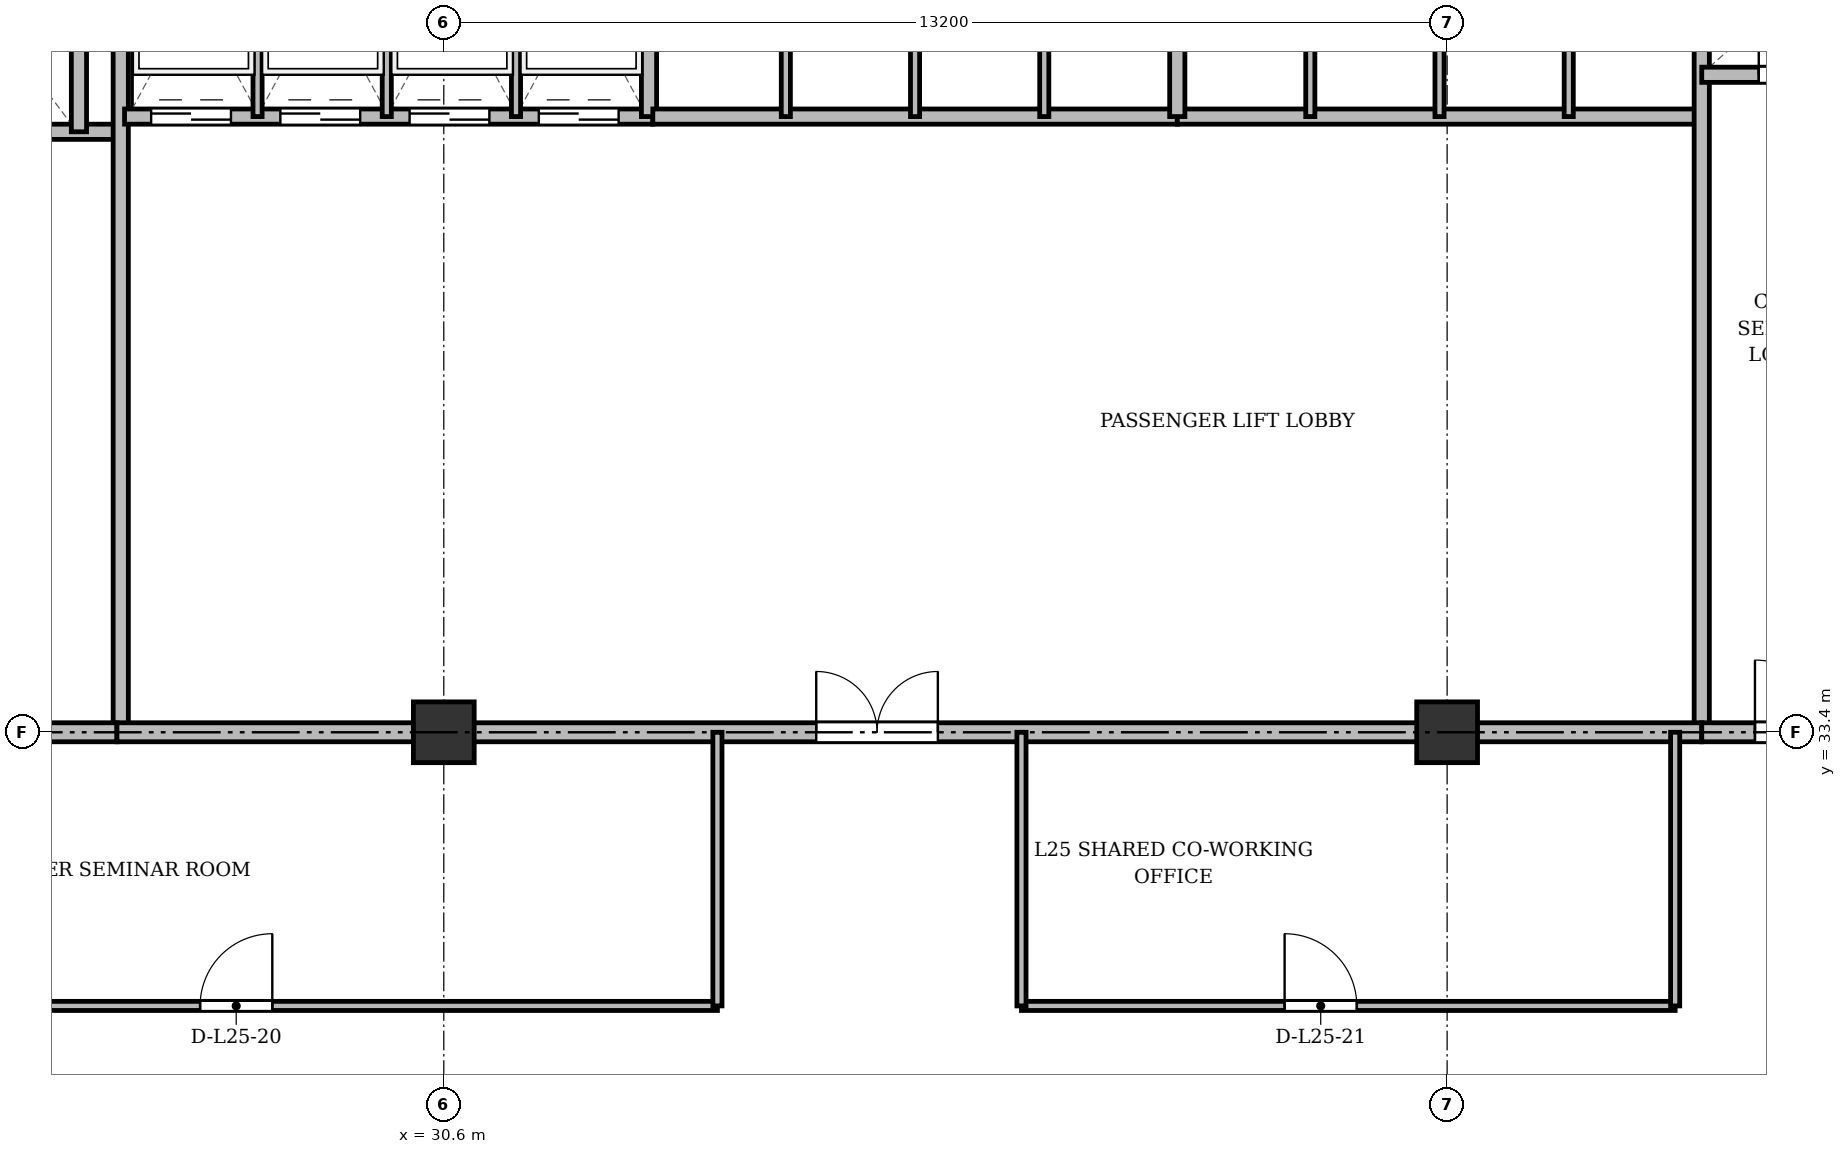
"""IFC4 building model, lengths in metres.
Left out: names, types, materials, properties, quantities, classifications, styles, units other than length and angle.
Written with IfcOpenShell. Run it as: python <this file> out.ifc"""

import sys

from ifc_helpers import new_model, si_unit, direction, frame, frame_2d, origin, origin_2d, place, context, subcontext, project, spatial, rectangle, extrude, source, transform, mapped, element, fill, save


model = new_model("IFC4")
c1 = context("Model", 3, precision=1e-05, world=origin(), true_north=direction((0.0, 1.0)))
c2 = subcontext(c1, "Body", "Model", "MODEL_VIEW")
j1 = project(units=[si_unit("LENGTHUNIT", "METRE"), si_unit("PLANEANGLEUNIT", "RADIAN")], contexts=[c1])
p1 = place(None, origin())
s1 = spatial("IfcSite", under=j1, at=p1, CompositionType="ELEMENT")
p2 = place(p1, origin())
s2 = spatial("IfcBuilding", under=s1, at=p2, CompositionType="ELEMENT")
p3 = place(p2, frame((0.0, 0.0, 99.7)))
s3 = spatial("IfcBuildingStorey", under=s2, at=p3, CompositionType="ELEMENT", Elevation=99.7)
m1 = source(origin(), c2, "Body", "SweptSolid", [
    extrude(rectangle(XDim=0.8, YDim=0.8, at=origin_2d()), origin(), (0.0, 0.0, 1.0), 3.6),
])
for number, where, z_axis, x_axis in (
    (1, (30.6, 33.4, 0.0), (0.0, 0.0, 1.0), (1.0, 0.0, 0.0)),
    (2, (43.8, 33.4, 0.0), (0.0, 0.0, 1.0), (1.0, 0.0, 0.0)),
):
    element("IfcColumn", number, at=place(p3, frame(where, z_axis=z_axis, x_axis=x_axis)), inside=s3, PredefinedType="COLUMN", context=c2, shape_type="MappedRepresentation", body=[
        mapped(m1, transform((0.0, 0.0, 0.0), x_axis=(1.0, 0.0, 0.0), y_axis=(0.0, 1.0, 0.0), z_axis=(0.0, 0.0, 1.0), scale=1.0)),
    ])
p4 = place(p3, frame((19.55, 41.3, 0.0), z_axis=(0.0, 0.0, 1.0), x_axis=(1.0, 0.0, 0.0)))
e3 = element("IfcWall", 3, at=p4, inside=s3, PredefinedType="SOLIDWALL", context=c2, shape_type="SweptSolid", body=[
    extrude(rectangle(XDim=6.75, YDim=0.2, at=frame_2d((3.375, 0.0))), origin(), (0.0, 0.0, 1.0), 3.34),
])
p5 = place(p4, frame((1.7, 0.0, 0.0)))
e4 = element("IfcOpeningElement", 4, at=p5, cuts=e3, PredefinedType="OPENING", context=c2, shape_type="SweptSolid", body=[
    extrude(rectangle(XDim=1.1, YDim=2.15, at=frame_2d((0.55, 1.075))), frame((0.0, 0.11, 0.0), z_axis=(0.0, -1.0, 0.0), x_axis=(1.0, 0.0, 0.0)), (0.0, 0.0, 1.0), 0.22),
])
p6 = place(p4, frame((4.4, 0.0, 0.0)))
e5 = element("IfcOpeningElement", 5, at=p6, cuts=e3, PredefinedType="OPENING", context=c2, shape_type="SweptSolid", body=[
    extrude(rectangle(XDim=1.1, YDim=2.15, at=frame_2d((0.55, 1.075))), frame((0.0, 0.11, 0.0), z_axis=(0.0, -1.0, 0.0), x_axis=(1.0, 0.0, 0.0)), (0.0, 0.0, 1.0), 0.22),
])
p7 = place(p3, frame((25.8, 41.3, 0.0), z_axis=(0.0, 0.0, 1.0), x_axis=(0.0, 1.0, 0.0)))
e6 = element("IfcWall", 6, at=p7, inside=s3, PredefinedType="SOLIDWALL", context=c2, shape_type="SweptSolid", body=[
    extrude(rectangle(XDim=3.4, YDim=0.2, at=frame_2d((1.7, 0.0))), origin(), (0.0, 0.0, 1.0), 3.34),
])
p8 = place(p3, frame((26.35, 33.4, 0.0), z_axis=(0.0, 0.0, 1.0), x_axis=(0.0, 1.0, 0.0)))
e7 = element("IfcWall", 7, at=p8, inside=s3, PredefinedType="SOLIDWALL", context=c2, shape_type="SweptSolid", body=[
    extrude(rectangle(XDim=11.3, YDim=0.2, at=frame_2d((5.65, 0.0))), origin(), (0.0, 0.0, 1.0), 2.752),
])
p9 = place(p3, frame((19.5, 33.4, 0.0), z_axis=(0.0, 0.0, 1.0), x_axis=(1.0, 0.0, 0.0)))
e8 = element("IfcWall", 8, at=p9, inside=s3, PredefinedType="PARTITIONING", context=c2, shape_type="SweptSolid", body=[
    extrude(rectangle(XDim=6.8, YDim=0.25, at=frame_2d((3.4, 0.0))), origin(), (0.0, 0.0, 1.0), 2.752),
])
p10 = place(p9, frame((0.75, 0.0, 0.0)))
e9 = element("IfcOpeningElement", 9, at=p10, cuts=e8, PredefinedType="OPENING", context=c2, shape_type="SweptSolid", body=[
    extrude(rectangle(XDim=1.6, YDim=2.2, at=frame_2d((0.8, 1.1))), frame((0.0, 0.135, 0.0), z_axis=(0.0, -1.0, 0.0), x_axis=(1.0, 0.0, 0.0)), (0.0, 0.0, 1.0), 0.27),
])
p11 = place(p3, frame((26.4, 41.5, 0.0), z_axis=(0.0, 0.0, 1.0), x_axis=(1.0, 0.0, 0.0)))
e10 = element("IfcWall", 10, at=p11, inside=s3, PredefinedType="SOLIDWALL", context=c2, shape_type="SweptSolid", body=[
    extrude(rectangle(XDim=6.95, YDim=0.2, at=frame_2d((3.475, 0.0))), origin(), (0.0, 0.0, 1.0), 3.34),
])
p12 = place(p11, frame((0.35, 0.0, 0.0)))
e11 = element("IfcOpeningElement", 11, at=p12, cuts=e10, PredefinedType="OPENING", context=c2, shape_type="SweptSolid", body=[
    extrude(rectangle(XDim=1.05, YDim=2.15, at=frame_2d((0.525, 1.075))), frame((0.0, 0.11, 0.0), z_axis=(0.0, -1.0, 0.0), x_axis=(1.0, 0.0, 0.0)), (0.0, 0.0, 1.0), 0.22),
])
p13 = place(p11, frame((2.05, 0.0, 0.0)))
e12 = element("IfcOpeningElement", 12, at=p13, cuts=e10, PredefinedType="OPENING", context=c2, shape_type="SweptSolid", body=[
    extrude(rectangle(XDim=1.05, YDim=2.15, at=frame_2d((0.525, 1.075))), frame((0.0, 0.11, 0.0), z_axis=(0.0, -1.0, 0.0), x_axis=(1.0, 0.0, 0.0)), (0.0, 0.0, 1.0), 0.22),
])
p14 = place(p11, frame((3.75, 0.0, 0.0)))
e13 = element("IfcOpeningElement", 13, at=p14, cuts=e10, PredefinedType="OPENING", context=c2, shape_type="SweptSolid", body=[
    extrude(rectangle(XDim=1.05, YDim=2.15, at=frame_2d((0.525, 1.075))), frame((0.0, 0.11, 0.0), z_axis=(0.0, -1.0, 0.0), x_axis=(1.0, 0.0, 0.0)), (0.0, 0.0, 1.0), 0.22),
])
p15 = place(p11, frame((5.45, 0.0, 0.0)))
e14 = element("IfcOpeningElement", 14, at=p15, cuts=e10, PredefinedType="OPENING", context=c2, shape_type="SweptSolid", body=[
    extrude(rectangle(XDim=1.05, YDim=2.15, at=frame_2d((0.525, 1.075))), frame((0.0, 0.11, 0.0), z_axis=(0.0, -1.0, 0.0), x_axis=(1.0, 0.0, 0.0)), (0.0, 0.0, 1.0), 0.22),
])
p16 = place(p3, frame((33.3, 41.5, 0.0), z_axis=(0.0, 0.0, 1.0), x_axis=(0.0, 1.0, 0.0)))
e15 = element("IfcWall", 15, at=p16, inside=s3, PredefinedType="SOLIDWALL", context=c2, shape_type="SweptSolid", body=[
    extrude(rectangle(XDim=3.2, YDim=0.2, at=frame_2d((1.6, 0.0))), origin(), (0.0, 0.0, 1.0), 3.34),
])
for number, where, z_axis, x_axis in (
    (16, (28.15, 41.5, 0.0), (0.0, 0.0, 1.0), (0.0, 1.0, 0.0)),
    (17, (29.85, 41.5, 0.0), (0.0, 0.0, 1.0), (0.0, 1.0, 0.0)),
    (18, (31.55, 41.5, 0.0), (0.0, 0.0, 1.0), (0.0, 1.0, 0.0)),
):
    element("IfcWall", number, at=place(p3, frame(where, z_axis=z_axis, x_axis=x_axis)), inside=s3, PredefinedType="PARTITIONING", context=c2, shape_type="SweptSolid", body=[
        extrude(rectangle(XDim=3.2, YDim=0.12, at=frame_2d((1.6, 0.0))), origin(), (0.0, 0.0, 1.0), 3.34),
    ])
p17 = place(p3, frame((33.35, 41.5, 0.0), z_axis=(0.0, 0.0, 1.0), x_axis=(1.0, 0.0, 0.0)))
e19 = element("IfcWall", 19, at=p17, inside=s3, PredefinedType="SOLIDWALL", context=c2, shape_type="SweptSolid", body=[
    extrude(rectangle(XDim=6.9, YDim=0.2, at=frame_2d((3.45, 0.0))), origin(), (0.0, 0.0, 1.0), 3.34),
])
for number, where, z_axis, x_axis in (
    (20, (35.1, 41.5, 0.0), (0.0, 0.0, 1.0), (0.0, 1.0, 0.0)),
    (21, (36.8, 41.5, 0.0), (0.0, 0.0, 1.0), (0.0, 1.0, 0.0)),
    (22, (38.5, 41.5, 0.0), (0.0, 0.0, 1.0), (0.0, 1.0, 0.0)),
):
    element("IfcWall", number, at=place(p3, frame(where, z_axis=z_axis, x_axis=x_axis)), inside=s3, PredefinedType="PARTITIONING", context=c2, shape_type="SweptSolid", body=[
        extrude(rectangle(XDim=3.2, YDim=0.12, at=frame_2d((1.6, 0.0))), origin(), (0.0, 0.0, 1.0), 3.34),
    ])
p18 = place(p3, frame((40.25, 41.5, 0.0), z_axis=(0.0, 0.0, 1.0), x_axis=(1.0, 0.0, 0.0)))
e23 = element("IfcWall", 23, at=p18, inside=s3, PredefinedType="SOLIDWALL", context=c2, shape_type="SweptSolid", body=[
    extrude(rectangle(XDim=6.9, YDim=0.2, at=frame_2d((3.45, 0.0))), origin(), (0.0, 0.0, 1.0), 2.84),
])
p19 = place(p3, frame((40.25, 41.5, 0.0), z_axis=(0.0, 0.0, 1.0), x_axis=(0.0, 1.0, 0.0)))
e24 = element("IfcWall", 24, at=p19, inside=s3, PredefinedType="SOLIDWALL", context=c2, shape_type="SweptSolid", body=[
    extrude(rectangle(XDim=3.2, YDim=0.2, at=frame_2d((1.6, 0.0))), origin(), (0.0, 0.0, 1.0), 3.34),
])
p20 = place(p3, frame((42.0, 41.5, 0.0), z_axis=(0.0, 0.0, 1.0), x_axis=(0.0, 1.0, 0.0)))
e25 = element("IfcWall", 25, at=p20, inside=s3, PredefinedType="PARTITIONING", context=c2, shape_type="SweptSolid", body=[
    extrude(rectangle(XDim=3.2, YDim=0.12, at=frame_2d((1.6, 0.0))), origin(), (0.0, 0.0, 1.0), 3.34),
])
p21 = place(p3, frame((43.7, 41.5, 0.0), z_axis=(0.0, 0.0, 1.0), x_axis=(0.0, 1.0, 0.0)))
e26 = element("IfcWall", 26, at=p21, inside=s3, PredefinedType="PARTITIONING", context=c2, shape_type="SweptSolid", body=[
    extrude(rectangle(XDim=3.2, YDim=0.12, at=frame_2d((1.6, 0.0))), origin(), (0.0, 0.0, 1.0), 2.84),
])
p22 = place(p3, frame((45.4, 41.5, 0.0), z_axis=(0.0, 0.0, 1.0), x_axis=(0.0, 1.0, 0.0)))
e27 = element("IfcWall", 27, at=p22, inside=s3, PredefinedType="PARTITIONING", context=c2, shape_type="SweptSolid", body=[
    extrude(rectangle(XDim=3.2, YDim=0.12, at=frame_2d((1.6, 0.0))), origin(), (0.0, 0.0, 1.0), 3.34),
])
p23 = place(p3, frame((47.15, 33.4, 0.0), z_axis=(0.0, 0.0, 1.0), x_axis=(0.0, 1.0, 0.0)))
e28 = element("IfcWall", 28, at=p23, inside=s3, PredefinedType="SOLIDWALL", context=c2, shape_type="SweptSolid", body=[
    extrude(rectangle(XDim=11.3, YDim=0.2, at=frame_2d((5.65, 0.0))), origin(), (0.0, 0.0, 1.0), 2.752),
])
p24 = place(p3, frame((26.3, 33.4, 0.0), z_axis=(0.0, 0.0, 1.0), x_axis=(1.0, 0.0, 0.0)))
e29 = element("IfcWall", 29, at=p24, inside=s3, PredefinedType="PARTITIONING", context=c2, shape_type="SweptSolid", body=[
    extrude(rectangle(XDim=20.85, YDim=0.25, at=frame_2d((10.425, 0.0))), origin(), (0.0, 0.0, 1.0), 2.752),
])
p25 = place(p24, frame((9.2, 0.0, 0.0)))
e30 = element("IfcOpeningElement", 30, at=p25, cuts=e29, PredefinedType="OPENING", context=c2, shape_type="SweptSolid", body=[
    extrude(rectangle(XDim=1.6, YDim=2.2, at=frame_2d((0.8, 1.1))), frame((0.0, 0.135, 0.0), z_axis=(0.0, -1.0, 0.0), x_axis=(1.0, 0.0, 0.0)), (0.0, 0.0, 1.0), 0.27),
])
p26 = place(p3, frame((47.15, 42.05, 0.0), z_axis=(0.0, 0.0, 1.0), x_axis=(1.0, 0.0, 0.0)))
e31 = element("IfcWall", 31, at=p26, inside=s3, PredefinedType="SOLIDWALL", context=c2, shape_type="SweptSolid", body=[
    extrude(rectangle(XDim=7.85, YDim=0.2, at=frame_2d((3.925, 0.0))), origin(), (0.0, 0.0, 1.0), 2.84),
])
p27 = place(p26, frame((0.75, 0.0, 0.0)))
e32 = element("IfcOpeningElement", 32, at=p27, cuts=e31, PredefinedType="OPENING", context=c2, shape_type="SweptSolid", body=[
    extrude(rectangle(XDim=0.9, YDim=2.1, at=frame_2d((0.45, 1.05))), frame((0.0, 0.11, 0.0), z_axis=(0.0, -1.0, 0.0), x_axis=(1.0, 0.0, 0.0)), (0.0, 0.0, 1.0), 0.22),
])
p28 = place(p26, frame((3.85, 0.0, 0.0)))
e33 = element("IfcOpeningElement", 33, at=p28, cuts=e31, PredefinedType="OPENING", context=c2, shape_type="SweptSolid", body=[
    extrude(rectangle(XDim=0.9, YDim=2.1, at=frame_2d((0.45, 1.05))), frame((0.0, 0.11, 0.0), z_axis=(0.0, -1.0, 0.0), x_axis=(1.0, 0.0, 0.0)), (0.0, 0.0, 1.0), 0.22),
])
p29 = place(p3, frame((47.15, 33.4, 0.0), z_axis=(0.0, 0.0, 1.0), x_axis=(1.0, 0.0, 0.0)))
e34 = element("IfcWall", 34, at=p29, inside=s3, PredefinedType="PARTITIONING", context=c2, shape_type="SweptSolid", body=[
    extrude(rectangle(XDim=11.15, YDim=0.25, at=frame_2d((5.575, 0.0))), origin(), (0.0, 0.0, 1.0), 2.752),
])
p30 = place(p29, frame((0.7, 0.0, 0.0)))
e35 = element("IfcOpeningElement", 35, at=p30, cuts=e34, PredefinedType="OPENING", context=c2, shape_type="SweptSolid", body=[
    extrude(rectangle(XDim=0.95, YDim=2.15, at=frame_2d((0.475, 1.075))), frame((0.0, 0.135, 0.0), z_axis=(0.0, -1.0, 0.0), x_axis=(1.0, 0.0, 0.0)), (0.0, 0.0, 1.0), 0.27),
])
p31 = place(p29, frame((6.0, 0.0, 0.0)))
e36 = element("IfcOpeningElement", 36, at=p31, cuts=e34, PredefinedType="OPENING", context=c2, shape_type="SweptSolid", body=[
    extrude(rectangle(XDim=1.2, YDim=2.15, at=frame_2d((0.6, 1.075))), frame((0.0, 0.135, 0.0), z_axis=(0.0, -1.0, 0.0), x_axis=(1.0, 0.0, 0.0)), (0.0, 0.0, 1.0), 0.27),
])
p32 = place(p3, frame((22.45, 29.8, 0.0), z_axis=(0.0, 0.0, 1.0), x_axis=(1.0, 0.0, 0.0)))
e37 = element("IfcWall", 37, at=p32, inside=s3, PredefinedType="PARTITIONING", context=c2, shape_type="SweptSolid", body=[
    extrude(rectangle(XDim=11.75, YDim=0.12, at=frame_2d((5.875, 0.0))), origin(), (0.0, 0.0, 1.0), 2.84),
])
p33 = place(p32, frame((4.944, 0.0, 0.0)))
e38 = element("IfcOpeningElement", 38, at=p33, cuts=e37, PredefinedType="OPENING", context=c2, shape_type="SweptSolid", body=[
    extrude(rectangle(XDim=0.95, YDim=2.15, at=frame_2d((0.475, 1.075))), frame((0.0, 0.07, 0.0), z_axis=(0.0, -1.0, 0.0), x_axis=(1.0, 0.0, 0.0)), (0.0, 0.0, 1.0), 0.14),
])
p34 = place(p3, frame((38.2, 29.8, 0.0), z_axis=(0.0, 0.0, 1.0), x_axis=(1.0, 0.0, 0.0)))
e39 = element("IfcWall", 39, at=p34, inside=s3, PredefinedType="PARTITIONING", context=c2, shape_type="SweptSolid", body=[
    extrude(rectangle(XDim=8.6, YDim=0.12, at=frame_2d((4.3, 0.0))), origin(), (0.0, 0.0, 1.0), 2.84),
])
p35 = place(p34, frame((3.462, 0.0, 0.0)))
e40 = element("IfcOpeningElement", 40, at=p35, cuts=e39, PredefinedType="OPENING", context=c2, shape_type="SweptSolid", body=[
    extrude(rectangle(XDim=0.95, YDim=2.15, at=frame_2d((0.475, 1.075))), frame((0.0, 0.07, 0.0), z_axis=(0.0, -1.0, 0.0), x_axis=(1.0, 0.0, 0.0)), (0.0, 0.0, 1.0), 0.14),
])
for number, where, z_axis, x_axis in (
    (41, (34.2, 29.8, 0.0), (0.0, 0.0, 1.0), (0.0, 1.0, 0.0)),
    (42, (38.2, 29.8, 0.0), (0.0, 0.0, 1.0), (0.0, 1.0, 0.0)),
    (43, (46.8, 29.8, 0.0), (0.0, 0.0, 1.0), (0.0, 1.0, 0.0)),
):
    element("IfcWall", number, at=place(p3, frame(where, z_axis=z_axis, x_axis=x_axis)), inside=s3, PredefinedType="PARTITIONING", context=c2, shape_type="SweptSolid", body=[
        extrude(rectangle(XDim=3.6, YDim=0.12, at=frame_2d((1.8, 0.0))), origin(), (0.0, 0.0, 1.0), 2.752),
    ])
m2 = source(origin(), c2, "Body", "SweptSolid", [
    extrude(rectangle(XDim=1.05, YDim=2.15, at=frame_2d((0.525, 1.075))), frame((0.0, 0.025, 0.0), z_axis=(0.0, -1.0, 0.0), x_axis=(1.0, 0.0, 0.0)), (0.0, 0.0, 1.0), 0.05),
])
p36 = place(p12, origin())
e44 = element("IfcDoor", 44, at=p36, inside=s3, OperationType="DOUBLE_DOOR_SLIDING", PredefinedType="DOOR", context=c2, shape_type="MappedRepresentation", body=[
    mapped(m2, transform((0.0, 0.0, 0.0), x_axis=(1.0, 0.0, 0.0), y_axis=(0.0, 1.0, 0.0), z_axis=(0.0, 0.0, 1.0), scale=1.0)),
])
fill(e11, e44)
p37 = place(p13, origin())
e45 = element("IfcDoor", 45, at=p37, inside=s3, OperationType="DOUBLE_DOOR_SLIDING", PredefinedType="DOOR", context=c2, shape_type="MappedRepresentation", body=[
    mapped(m2, transform((0.0, 0.0, 0.0), x_axis=(1.0, 0.0, 0.0), y_axis=(0.0, 1.0, 0.0), z_axis=(0.0, 0.0, 1.0), scale=1.0)),
])
fill(e12, e45)
p38 = place(p14, origin())
e46 = element("IfcDoor", 46, at=p38, inside=s3, OperationType="DOUBLE_DOOR_SLIDING", PredefinedType="DOOR", context=c2, shape_type="MappedRepresentation", body=[
    mapped(m2, transform((0.0, 0.0, 0.0), x_axis=(1.0, 0.0, 0.0), y_axis=(0.0, 1.0, 0.0), z_axis=(0.0, 0.0, 1.0), scale=1.0)),
])
fill(e13, e46)
p39 = place(p15, origin())
e47 = element("IfcDoor", 47, at=p39, inside=s3, OperationType="DOUBLE_DOOR_SLIDING", PredefinedType="DOOR", context=c2, shape_type="MappedRepresentation", body=[
    mapped(m2, transform((0.0, 0.0, 0.0), x_axis=(1.0, 0.0, 0.0), y_axis=(0.0, 1.0, 0.0), z_axis=(0.0, 0.0, 1.0), scale=1.0)),
])
fill(e14, e47)
m3 = source(origin(), c2, "Body", "SweptSolid", [
    extrude(rectangle(XDim=1.6, YDim=2.2, at=frame_2d((0.8, 1.1))), frame((0.0, 0.025, 0.0), z_axis=(0.0, -1.0, 0.0), x_axis=(1.0, 0.0, 0.0)), (0.0, 0.0, 1.0), 0.05),
])
p40 = place(p25, origin())
e48 = element("IfcDoor", 48, at=p40, inside=s3, OperationType="DOUBLE_DOOR_SINGLE_SWING", PredefinedType="DOOR", context=c2, shape_type="MappedRepresentation", body=[
    mapped(m3, transform((0.0, 0.0, 0.0), x_axis=(1.0, 0.0, 0.0), y_axis=(0.0, 1.0, 0.0), z_axis=(0.0, 0.0, 1.0), scale=1.0)),
])
fill(e30, e48)
m4 = source(origin(), c2, "Body", "SweptSolid", [
    extrude(rectangle(XDim=0.9, YDim=2.1, at=frame_2d((0.45, 1.05))), frame((0.0, 0.025, 0.0), z_axis=(0.0, -1.0, 0.0), x_axis=(1.0, 0.0, 0.0)), (0.0, 0.0, 1.0), 0.05),
])
p41 = place(p27, origin())
e49 = element("IfcDoor", 49, at=p41, inside=s3, OperationType="SINGLE_SWING_LEFT", PredefinedType="DOOR", context=c2, shape_type="MappedRepresentation", body=[
    mapped(m4, transform((0.0, 0.0, 0.0), x_axis=(1.0, 0.0, 0.0), y_axis=(0.0, 1.0, 0.0), z_axis=(0.0, 0.0, 1.0), scale=1.0)),
])
fill(e32, e49)
m5 = source(origin(), c2, "Body", "SweptSolid", [
    extrude(rectangle(XDim=0.95, YDim=2.15, at=frame_2d((0.475, 1.075))), frame((0.0, 0.025, 0.0), z_axis=(0.0, -1.0, 0.0), x_axis=(1.0, 0.0, 0.0)), (0.0, 0.0, 1.0), 0.05),
])
p42 = place(p30, origin())
e50 = element("IfcDoor", 50, at=p42, inside=s3, OperationType="SINGLE_SWING_LEFT", PredefinedType="DOOR", context=c2, shape_type="MappedRepresentation", body=[
    mapped(m5, transform((0.0, 0.0, 0.0), x_axis=(1.0, 0.0, 0.0), y_axis=(0.0, 1.0, 0.0), z_axis=(0.0, 0.0, 1.0), scale=1.0)),
])
fill(e35, e50)
p43 = place(p33, origin())
e51 = element("IfcDoor", 51, at=p43, inside=s3, OperationType="SINGLE_SWING_RIGHT", PredefinedType="DOOR", context=c2, shape_type="MappedRepresentation", body=[
    mapped(m5, transform((0.0, 0.0, 0.0), x_axis=(1.0, 0.0, 0.0), y_axis=(0.0, 1.0, 0.0), z_axis=(0.0, 0.0, 1.0), scale=1.0)),
])
fill(e38, e51)
p44 = place(p35, origin())
e52 = element("IfcDoor", 52, at=p44, inside=s3, OperationType="SINGLE_SWING_LEFT", PredefinedType="DOOR", context=c2, shape_type="MappedRepresentation", body=[
    mapped(m5, transform((0.0, 0.0, 0.0), x_axis=(1.0, 0.0, 0.0), y_axis=(0.0, 1.0, 0.0), z_axis=(0.0, 0.0, 1.0), scale=1.0)),
])
fill(e40, e52)
save(model, sys.argv[1])
